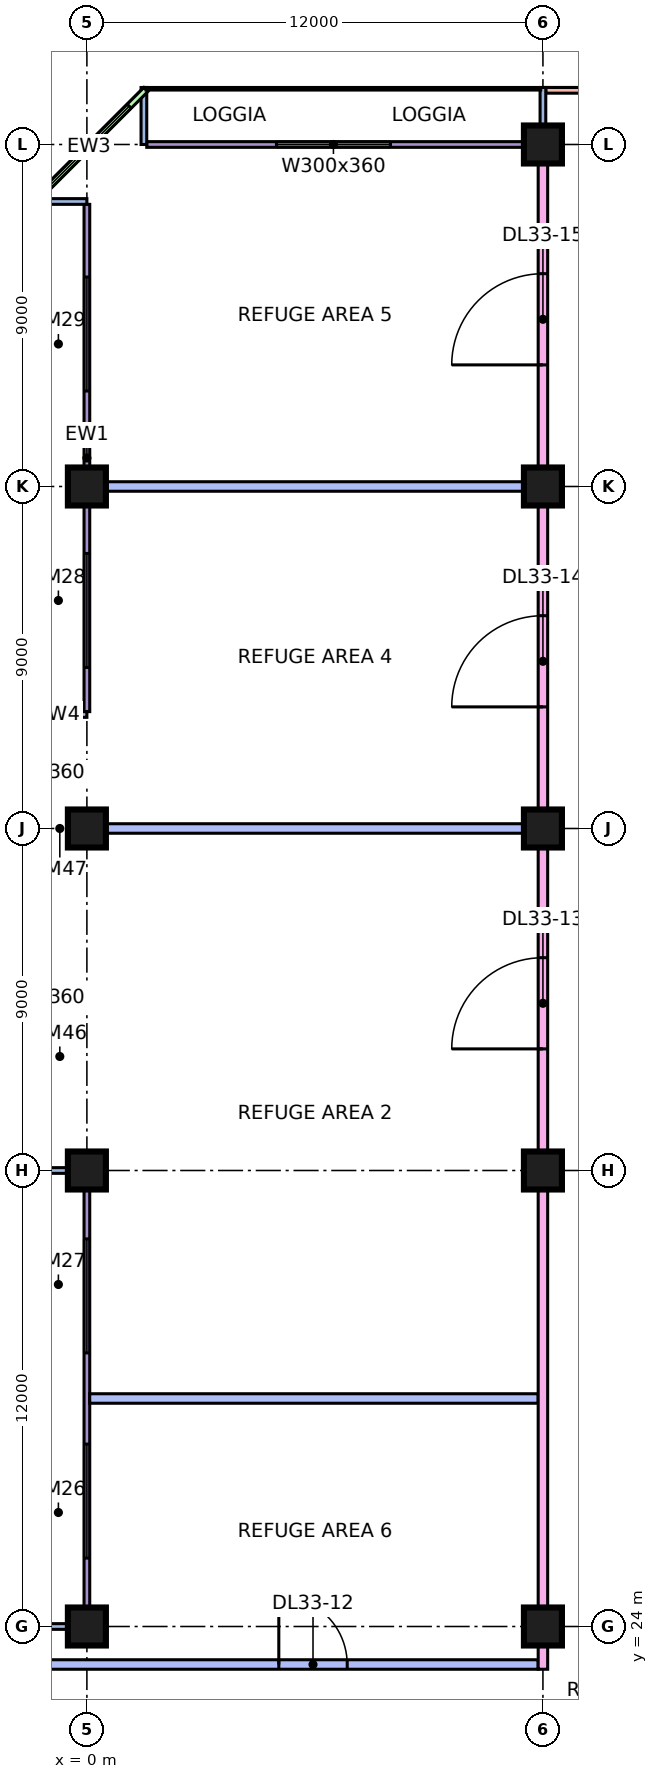
"""IFC4 building model, lengths in metres.
Left out: names, types, materials, properties, quantities, classifications, styles, units other than length and angle.
Written with IfcOpenShell. Run it as: python <this file> out.ifc"""

import sys

from ifc_helpers import new_model, si_unit, direction, frame, frame_2d, origin, origin_2d, place, context, subcontext, project, spatial, rectangle, extrude, element, fill, save


model = new_model("IFC4")
c1 = context("Model", 3, precision=1e-05, world=origin(), true_north=direction((0.0, 1.0)))
c2 = subcontext(c1, "Body", "Model", "MODEL_VIEW")
j1 = project(units=[si_unit("LENGTHUNIT", "METRE"), si_unit("PLANEANGLEUNIT", "RADIAN")], contexts=[c1])
p1 = place(None, origin())
s1 = spatial("IfcSite", under=j1, at=p1, CompositionType="ELEMENT")
p2 = place(p1, origin())
s2 = spatial("IfcBuilding", under=s1, at=p2, CompositionType="ELEMENT")
p3 = place(p2, frame((0.0, 0.0, 140.65)))
s3 = spatial("IfcBuildingStorey", under=s2, at=p3, CompositionType="ELEMENT", Elevation=140.65)
for number, where, z_axis, x_axis in (
    (1, (0.0, 24.0, 0.0), (0.0, 0.0, 1.0), (1.0, 0.0, 0.0)),
    (2, (0.0, 36.0, 0.0), (0.0, 0.0, 1.0), (1.0, 0.0, 0.0)),
):
    element("IfcColumn", number, at=place(p3, frame(where, z_axis=z_axis, x_axis=x_axis)), inside=s3, PredefinedType="COLUMN", context=c2, shape_type="SweptSolid", body=[
        extrude(rectangle(XDim=1.0, YDim=1.0, at=origin_2d()), origin(), (0.0, 0.0, 1.0), 5.5),
    ])
p4 = place(p3, frame((0.0, 45.0, 0.0), z_axis=(0.0, 0.0, 1.0), x_axis=(1.0, 0.0, 0.0)))
e3 = element("IfcColumn", 3, at=p4, inside=s3, PredefinedType="COLUMN", context=c2, shape_type="SweptSolid", body=[
    extrude(rectangle(XDim=1.0, YDim=1.0, at=origin_2d()), origin(), (0.0, 0.0, 1.0), 5.5),
])
for number, where, z_axis, x_axis in (
    (4, (0.0, 54.0, 0.0), (0.0, 0.0, 1.0), (1.0, 0.0, 0.0)),
    (5, (12.0, 24.0, 0.0), (0.0, 0.0, 1.0), (1.0, 0.0, 0.0)),
    (6, (12.0, 36.0, 0.0), (0.0, 0.0, 1.0), (1.0, 0.0, 0.0)),
    (7, (12.0, 45.0, 0.0), (0.0, 0.0, 1.0), (1.0, 0.0, 0.0)),
    (8, (12.0, 54.0, 0.0), (0.0, 0.0, 1.0), (1.0, 0.0, 0.0)),
    (9, (12.0, 63.0, 0.0), (0.0, 0.0, 1.0), (1.0, 0.0, 0.0)),
):
    element("IfcColumn", number, at=place(p3, frame(where, z_axis=z_axis, x_axis=x_axis)), inside=s3, PredefinedType="COLUMN", context=c2, shape_type="SweptSolid", body=[
        extrude(rectangle(XDim=1.0, YDim=1.0, at=origin_2d()), origin(), (0.0, 0.0, 1.0), 5.5),
    ])
p5 = place(p3, frame((22.5, 64.425, 0.0), z_axis=(0.0, 0.0, 1.0), x_axis=(-1.0, 0.0, 0.0)))
e10 = element("IfcWall", 10, at=p5, inside=s3, PredefinedType="SOLIDWALL", context=c2, shape_type="SweptSolid", body=[
    extrude(rectangle(XDim=10.425, YDim=0.15, at=frame_2d((5.212, 0.0))), origin(), (0.0, 0.0, 1.0), 5.05),
])
p6 = place(p5, frame((1.95, 0.0, 0.45)))
e11 = element("IfcOpeningElement", 11, at=p6, cuts=e10, PredefinedType="OPENING", context=c2, shape_type="SweptSolid", body=[
    extrude(rectangle(XDim=3.0, YDim=3.6, at=frame_2d((1.5, 1.8))), frame((0.0, 0.085, 0.0), z_axis=(0.0, -1.0, 0.0), x_axis=(1.0, 0.0, 0.0)), (0.0, 0.0, 1.0), 0.17),
])
p7 = place(p3, frame((11.925, 63.0, 0.0), z_axis=(0.0, 0.0, 1.0), x_axis=(-1.0, 0.0, 0.0)))
e12 = element("IfcWall", 12, at=p7, inside=s3, PredefinedType="SOLIDWALL", context=c2, shape_type="SweptSolid", body=[
    extrude(rectangle(XDim=10.35, YDim=0.15, at=frame_2d((5.175, 0.0))), origin(), (0.0, 0.0, 1.0), 5.05),
])
p8 = place(p7, frame((3.938, 0.0, 0.45)))
e13 = element("IfcOpeningElement", 13, at=p8, cuts=e12, PredefinedType="OPENING", context=c2, shape_type="SweptSolid", body=[
    extrude(rectangle(XDim=3.0, YDim=3.6, at=frame_2d((1.5, 1.8))), frame((0.0, 0.085, 0.0), z_axis=(0.0, -1.0, 0.0), x_axis=(1.0, 0.0, 0.0)), (0.0, 0.0, 1.0), 0.17),
])
for number, where, z_axis, x_axis in (
    (14, (12.0, 64.5, 0.0), (0.0, 0.0, 1.0), (0.0, -1.0, 0.0)),
    (15, (1.5, 64.5, 0.0), (0.0, 0.0, 1.0), (0.0, -1.0, 0.0)),
):
    element("IfcWall", number, at=place(p3, frame(where, z_axis=z_axis, x_axis=x_axis)), inside=s3, PredefinedType="SOLIDWALL", context=c2, shape_type="SweptSolid", body=[
        extrude(rectangle(XDim=1.5, YDim=0.15, at=frame_2d((0.75, 0.0))), origin(), (0.0, 0.0, 1.0), 5.05),
    ])
p9 = place(p3, frame((1.553, 64.447, 0.0), z_axis=(0.0, 0.0, 1.0), x_axis=(-0.707106781187, -0.707106781187, 0.0)))
e16 = element("IfcWall", 16, at=p9, inside=s3, PredefinedType="SOLIDWALL", context=c2, shape_type="SweptSolid", body=[
    extrude(rectangle(XDim=4.243, YDim=0.15, at=frame_2d((2.121, 0.0))), origin(), (0.0, 0.0, 1.0), 5.05),
])
p10 = place(p9, frame((0.621, 0.0, 0.45)))
e17 = element("IfcOpeningElement", 17, at=p10, cuts=e16, PredefinedType="OPENING", context=c2, shape_type="SweptSolid", body=[
    extrude(rectangle(XDim=3.0, YDim=3.6, at=frame_2d((1.5, 1.8))), frame((0.0, 0.085, 0.0), z_axis=(0.0, -1.0, 0.0), x_axis=(1.0, 0.0, 0.0)), (0.0, 0.0, 1.0), 0.17),
])
p11 = place(p3, frame((0.0, 61.425, 0.0), z_axis=(0.0, 0.0, 1.0), x_axis=(0.0, -1.0, 0.0)))
e18 = element("IfcWall", 18, at=p11, inside=s3, PredefinedType="SOLIDWALL", context=c2, shape_type="SweptSolid", body=[
    extrude(rectangle(XDim=13.35, YDim=0.15, at=frame_2d((6.675, 0.0))), origin(), (0.0, 0.0, 1.0), 5.05),
])
p12 = place(p11, frame((1.913, 0.0, 0.45)))
e19 = element("IfcOpeningElement", 19, at=p12, cuts=e18, PredefinedType="OPENING", context=c2, shape_type="SweptSolid", body=[
    extrude(rectangle(XDim=3.0, YDim=3.6, at=frame_2d((1.5, 1.8))), frame((0.0, 0.085, 0.0), z_axis=(0.0, -1.0, 0.0), x_axis=(1.0, 0.0, 0.0)), (0.0, 0.0, 1.0), 0.17),
])
p13 = place(p11, frame((9.188, 0.0, 0.45)))
e20 = element("IfcOpeningElement", 20, at=p13, cuts=e18, PredefinedType="OPENING", context=c2, shape_type="SweptSolid", body=[
    extrude(rectangle(XDim=3.0, YDim=3.6, at=frame_2d((1.5, 1.8))), frame((0.0, 0.085, 0.0), z_axis=(0.0, -1.0, 0.0), x_axis=(1.0, 0.0, 0.0)), (0.0, 0.0, 1.0), 0.17),
])
for number, where, z_axis, x_axis in (
    (21, (-1.5, 61.5, 0.0), (0.0, 0.0, 1.0), (1.0, 0.0, 0.0)),
    (22, (-1.5, 48.0, 0.0), (0.0, 0.0, 1.0), (1.0, 0.0, 0.0)),
):
    element("IfcWall", number, at=place(p3, frame(where, z_axis=z_axis, x_axis=x_axis)), inside=s3, PredefinedType="SOLIDWALL", context=c2, shape_type="SweptSolid", body=[
        extrude(rectangle(XDim=1.5, YDim=0.15, at=frame_2d((0.75, 0.0))), origin(), (0.0, 0.0, 1.0), 5.05),
    ])
p14 = place(p3, frame((0.0, 35.925, 0.0), z_axis=(0.0, 0.0, 1.0), x_axis=(0.0, -1.0, 0.0)))
e23 = element("IfcWall", 23, at=p14, inside=s3, PredefinedType="SOLIDWALL", context=c2, shape_type="SweptSolid", body=[
    extrude(rectangle(XDim=11.85, YDim=0.15, at=frame_2d((5.925, 0.0))), origin(), (0.0, 0.0, 1.0), 5.05),
])
p15 = place(p14, frame((1.725, 0.0, 0.45)))
e24 = element("IfcOpeningElement", 24, at=p15, cuts=e23, PredefinedType="OPENING", context=c2, shape_type="SweptSolid", body=[
    extrude(rectangle(XDim=3.0, YDim=3.6, at=frame_2d((1.5, 1.8))), frame((0.0, 0.085, 0.0), z_axis=(0.0, -1.0, 0.0), x_axis=(1.0, 0.0, 0.0)), (0.0, 0.0, 1.0), 0.17),
])
p16 = place(p14, frame((7.125, 0.0, 0.45)))
e25 = element("IfcOpeningElement", 25, at=p16, cuts=e23, PredefinedType="OPENING", context=c2, shape_type="SweptSolid", body=[
    extrude(rectangle(XDim=3.0, YDim=3.6, at=frame_2d((1.5, 1.8))), frame((0.0, 0.085, 0.0), z_axis=(0.0, -1.0, 0.0), x_axis=(1.0, 0.0, 0.0)), (0.0, 0.0, 1.0), 0.17),
])
for number, where, z_axis, x_axis in (
    (26, (-1.5, 36.0, 0.0), (0.0, 0.0, 1.0), (1.0, 0.0, 0.0)),
    (27, (-1.5, 24.0, 0.0), (0.0, 0.0, 1.0), (1.0, 0.0, 0.0)),
):
    element("IfcWall", number, at=place(p3, frame(where, z_axis=z_axis, x_axis=x_axis)), inside=s3, PredefinedType="SOLIDWALL", context=c2, shape_type="SweptSolid", body=[
        extrude(rectangle(XDim=1.5, YDim=0.15, at=frame_2d((0.75, 0.0))), origin(), (0.0, 0.0, 1.0), 5.05),
    ])
p17 = place(p3, frame((-1.35, 23.0, 0.0), z_axis=(0.0, 0.0, 1.0), x_axis=(1.0, 0.0, 0.0)))
e28 = element("IfcWall", 28, at=p17, inside=s3, PredefinedType="PARTITIONING", context=c2, shape_type="SweptSolid", body=[
    extrude(rectangle(XDim=13.225, YDim=0.25, at=frame_2d((6.613, 0.0))), origin(), (0.0, 0.0, 1.0), 5.05),
])
p18 = place(p17, frame((6.4, 0.0, 0.0)))
e29 = element("IfcOpeningElement", 29, at=p18, cuts=e28, PredefinedType="OPENING", context=c2, shape_type="SweptSolid", body=[
    extrude(rectangle(XDim=1.8, YDim=2.1, at=frame_2d((0.9, 1.05))), frame((0.0, 0.135, 0.0), z_axis=(0.0, -1.0, 0.0), x_axis=(1.0, 0.0, 0.0)), (0.0, 0.0, 1.0), 0.27),
])
e30 = element("IfcWall", 30, at=p4, inside=s3, PredefinedType="PARTITIONING", context=c2, shape_type="SweptSolid", body=[
    extrude(rectangle(XDim=11.875, YDim=0.25, at=frame_2d((5.938, 0.0))), origin(), (0.0, 0.0, 1.0), 5.05),
])
for number, where, z_axis, x_axis in (
    (31, (0.074, 30.0, 0.0), (0.0, 0.0, 1.0), (1.0, 0.0, 0.0)),
    (32, (0.074, 54.0, 0.0), (0.0, 0.0, 1.0), (1.0, 0.0, 0.0)),
):
    element("IfcWall", number, at=place(p3, frame(where, z_axis=z_axis, x_axis=x_axis)), inside=s3, PredefinedType="PARTITIONING", context=c2, shape_type="SweptSolid", body=[
        extrude(rectangle(XDim=11.801, YDim=0.25, at=frame_2d((5.9, 0.0))), origin(), (0.0, 0.0, 1.0), 5.05),
    ])
p19 = place(p3, frame((12.0, 22.875, 0.0), z_axis=(0.0, 0.0, 1.0), x_axis=(0.0, 1.0, 0.0)))
e33 = element("IfcWall", 33, at=p19, inside=s3, PredefinedType="PARTITIONING", context=c2, shape_type="SweptSolid", body=[
    extrude(rectangle(XDim=40.125, YDim=0.25, at=frame_2d((20.062, 0.0))), origin(), (0.0, 0.0, 1.0), 2.45),
])
p20 = place(p19, frame((16.325, 0.0, 0.0)))
e34 = element("IfcOpeningElement", 34, at=p20, cuts=e33, PredefinedType="OPENING", context=c2, shape_type="SweptSolid", body=[
    extrude(rectangle(XDim=2.4, YDim=2.1, at=frame_2d((1.2, 1.05))), frame((0.0, 0.135, 0.0), z_axis=(0.0, -1.0, 0.0), x_axis=(1.0, 0.0, 0.0)), (0.0, 0.0, 1.0), 0.27),
])
p21 = place(p19, frame((25.325, 0.0, 0.0)))
e35 = element("IfcOpeningElement", 35, at=p21, cuts=e33, PredefinedType="OPENING", context=c2, shape_type="SweptSolid", body=[
    extrude(rectangle(XDim=2.4, YDim=2.1, at=frame_2d((1.2, 1.05))), frame((0.0, 0.135, 0.0), z_axis=(0.0, -1.0, 0.0), x_axis=(1.0, 0.0, 0.0)), (0.0, 0.0, 1.0), 0.27),
])
p22 = place(p19, frame((34.325, 0.0, 0.0)))
e36 = element("IfcOpeningElement", 36, at=p22, cuts=e33, PredefinedType="OPENING", context=c2, shape_type="SweptSolid", body=[
    extrude(rectangle(XDim=2.4, YDim=2.1, at=frame_2d((1.2, 1.05))), frame((0.0, 0.135, 0.0), z_axis=(0.0, -1.0, 0.0), x_axis=(1.0, 0.0, 0.0)), (0.0, 0.0, 1.0), 0.27),
])
p23 = place(p8, origin())
e37 = element("IfcWindow", 37, at=p23, inside=s3, PartitioningType="SINGLE_PANEL", PredefinedType="WINDOW", context=c2, shape_type="SweptSolid", body=[
    extrude(rectangle(XDim=3.0, YDim=3.6, at=frame_2d((1.5, 1.8))), frame((0.0, 0.03, 0.0), z_axis=(0.0, -1.0, 0.0), x_axis=(1.0, 0.0, 0.0)), (0.0, 0.0, 1.0), 0.06),
])
fill(e13, e37)
p24 = place(p10, origin())
e38 = element("IfcWindow", 38, at=p24, inside=s3, PartitioningType="SINGLE_PANEL", PredefinedType="WINDOW", context=c2, shape_type="SweptSolid", body=[
    extrude(rectangle(XDim=3.0, YDim=3.6, at=frame_2d((1.5, 1.8))), frame((0.0, 0.03, 0.0), z_axis=(0.0, -1.0, 0.0), x_axis=(1.0, 0.0, 0.0)), (0.0, 0.0, 1.0), 0.06),
])
fill(e17, e38)
p25 = place(p12, origin())
e39 = element("IfcWindow", 39, at=p25, inside=s3, PartitioningType="SINGLE_PANEL", PredefinedType="WINDOW", context=c2, shape_type="SweptSolid", body=[
    extrude(rectangle(XDim=3.0, YDim=3.6, at=frame_2d((1.5, 1.8))), frame((0.0, 0.03, 0.0), z_axis=(0.0, -1.0, 0.0), x_axis=(1.0, 0.0, 0.0)), (0.0, 0.0, 1.0), 0.06),
])
fill(e19, e39)
p26 = place(p13, origin())
e40 = element("IfcWindow", 40, at=p26, inside=s3, PartitioningType="SINGLE_PANEL", PredefinedType="WINDOW", context=c2, shape_type="SweptSolid", body=[
    extrude(rectangle(XDim=3.0, YDim=3.6, at=frame_2d((1.5, 1.8))), frame((0.0, 0.03, 0.0), z_axis=(0.0, -1.0, 0.0), x_axis=(1.0, 0.0, 0.0)), (0.0, 0.0, 1.0), 0.06),
])
fill(e20, e40)
p27 = place(p15, origin())
e41 = element("IfcWindow", 41, at=p27, inside=s3, PartitioningType="SINGLE_PANEL", PredefinedType="WINDOW", context=c2, shape_type="SweptSolid", body=[
    extrude(rectangle(XDim=3.0, YDim=3.6, at=frame_2d((1.5, 1.8))), frame((0.0, 0.03, 0.0), z_axis=(0.0, -1.0, 0.0), x_axis=(1.0, 0.0, 0.0)), (0.0, 0.0, 1.0), 0.06),
])
fill(e24, e41)
p28 = place(p16, origin())
e42 = element("IfcWindow", 42, at=p28, inside=s3, PartitioningType="SINGLE_PANEL", PredefinedType="WINDOW", context=c2, shape_type="SweptSolid", body=[
    extrude(rectangle(XDim=3.0, YDim=3.6, at=frame_2d((1.5, 1.8))), frame((0.0, 0.03, 0.0), z_axis=(0.0, -1.0, 0.0), x_axis=(1.0, 0.0, 0.0)), (0.0, 0.0, 1.0), 0.06),
])
fill(e25, e42)
p29 = place(p18, origin())
e43 = element("IfcDoor", 43, at=p29, inside=s3, OperationType="DOUBLE_DOOR_SINGLE_SWING", PredefinedType="DOOR", context=c2, shape_type="SweptSolid", body=[
    extrude(rectangle(XDim=1.8, YDim=2.1, at=frame_2d((0.9, 1.05))), frame((0.0, 0.025, 0.0), z_axis=(0.0, -1.0, 0.0), x_axis=(1.0, 0.0, 0.0)), (0.0, 0.0, 1.0), 0.05),
])
fill(e29, e43)
p30 = place(p20, origin())
e44 = element("IfcDoor", 44, at=p30, inside=s3, OperationType="DOUBLE_DOOR_SINGLE_SWING", PredefinedType="DOOR", context=c2, shape_type="SweptSolid", body=[
    extrude(rectangle(XDim=2.4, YDim=2.1, at=frame_2d((1.2, 1.05))), frame((0.0, 0.025, 0.0), z_axis=(0.0, -1.0, 0.0), x_axis=(1.0, 0.0, 0.0)), (0.0, 0.0, 1.0), 0.05),
])
fill(e34, e44)
p31 = place(p21, origin())
e45 = element("IfcDoor", 45, at=p31, inside=s3, OperationType="DOUBLE_DOOR_SINGLE_SWING", PredefinedType="DOOR", context=c2, shape_type="SweptSolid", body=[
    extrude(rectangle(XDim=2.4, YDim=2.1, at=frame_2d((1.2, 1.05))), frame((0.0, 0.025, 0.0), z_axis=(0.0, -1.0, 0.0), x_axis=(1.0, 0.0, 0.0)), (0.0, 0.0, 1.0), 0.05),
])
fill(e35, e45)
p32 = place(p22, origin())
e46 = element("IfcDoor", 46, at=p32, inside=s3, OperationType="DOUBLE_DOOR_SINGLE_SWING", PredefinedType="DOOR", context=c2, shape_type="SweptSolid", body=[
    extrude(rectangle(XDim=2.4, YDim=2.1, at=frame_2d((1.2, 1.05))), frame((0.0, 0.025, 0.0), z_axis=(0.0, -1.0, 0.0), x_axis=(1.0, 0.0, 0.0)), (0.0, 0.0, 1.0), 0.05),
])
fill(e36, e46)
save(model, sys.argv[1])
